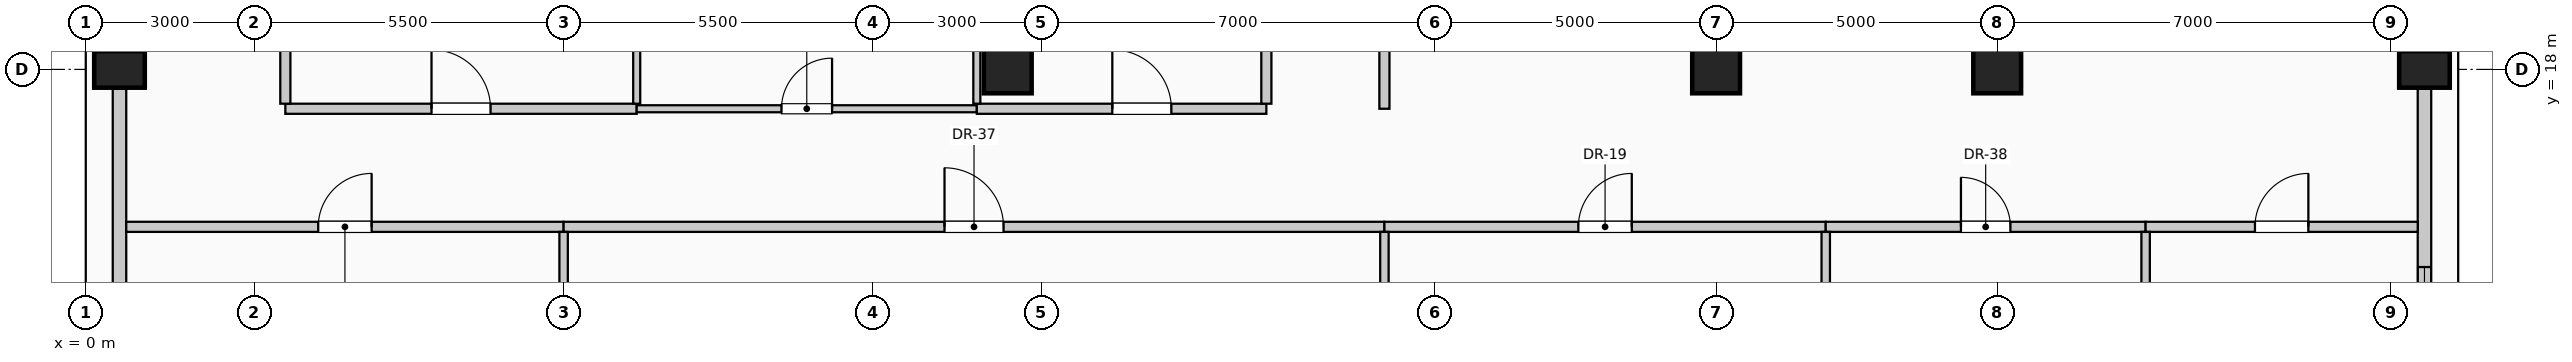
"""IFC4 building model, lengths in metres.
Left out: names, types, materials, properties, quantities, classifications, styles, units other than length and angle.
Written with IfcOpenShell. Run it as: python <this file> out.ifc"""

import sys

from ifc_helpers import new_model, si_unit, direction, frame, frame_2d, origin, origin_2d, place, context, subcontext, project, spatial, rectangle, circle, extrude, element, fill, save


model = new_model("IFC4")
c1 = context("Model", 3, precision=1e-05, world=origin(), true_north=direction((0.0, 1.0)))
c2 = subcontext(c1, "Body", "Model", "MODEL_VIEW")
j1 = project(units=[si_unit("LENGTHUNIT", "METRE"), si_unit("PLANEANGLEUNIT", "RADIAN")], contexts=[c1])
p1 = place(None, origin())
s1 = spatial("IfcSite", under=j1, at=p1, CompositionType="ELEMENT")
p2 = place(p1, origin())
s2 = spatial("IfcBuilding", under=s1, at=p2, CompositionType="ELEMENT")
p3 = place(p2, frame((0.0, 0.0, 301.0)))
s3 = spatial("IfcBuildingStorey", under=s2, at=p3, CompositionType="ELEMENT", Elevation=301.0)
for number, where, z_axis, x_axis in (
    (1, (0.6, 18.0, 0.0), (0.0, 0.0, 1.0), (0.0, 1.0, 0.0)),
    (2, (41.6, 18.0, 0.0), (0.0, 0.0, 1.0), (0.0, 1.0, 0.0)),
):
    element("IfcColumn", number, at=place(p3, frame(where, z_axis=z_axis, x_axis=x_axis)), inside=s3, PredefinedType="COLUMN", context=c2, shape_type="SweptSolid", body=[
        extrude(rectangle(XDim=0.65, YDim=0.9, at=origin_2d()), origin(), (0.0, 0.0, 1.0), 4.0),
    ])
for number, where, z_axis, x_axis in (
    (3, (16.4, 18.0, 0.0), (0.0, 0.0, 1.0), (1.0, 0.0, 0.0)),
    (4, (29.0, 18.0, 0.0), (0.0, 0.0, 1.0), (1.0, 0.0, 0.0)),
    (5, (34.0, 18.0, 0.0), (0.0, 0.0, 1.0), (1.0, 0.0, 0.0)),
):
    element("IfcColumn", number, at=place(p3, frame(where, z_axis=z_axis, x_axis=x_axis)), inside=s3, PredefinedType="COLUMN", context=c2, shape_type="SweptSolid", body=[
        extrude(circle(Radius=0.425, at=origin_2d()), origin(), (0.0, 0.0, 1.0), 4.0),
    ])
p4 = place(p3, frame((0.6, 10.345, 0.0), z_axis=(0.0, 0.0, 1.0), x_axis=(0.0, 1.0, 0.0)))
e6 = element("IfcWall", 6, at=p4, inside=s3, PredefinedType="SOLIDWALL", context=c2, shape_type="SweptSolid", body=[
    extrude(rectangle(XDim=7.31, YDim=0.24, at=frame_2d((3.655, 0.0))), origin(), (0.0, 0.0, 1.0), 3.025),
])
p5 = place(p4, frame((1.037, 0.0, 0.35)))
e7 = element("IfcOpeningElement", 7, at=p5, cuts=e6, PredefinedType="OPENING", context=c2, shape_type="SweptSolid", body=[
    extrude(rectangle(XDim=2.1, YDim=2.2, at=frame_2d((1.05, 1.1))), frame((0.0, 0.13, 0.0), z_axis=(0.0, -1.0, 0.0), x_axis=(1.0, 0.0, 0.0)), (0.0, 0.0, 1.0), 0.26),
])
p6 = place(p3, frame((41.6, 17.655, 0.0), z_axis=(0.0, 0.0, 1.0), x_axis=(0.0, -1.0, 0.0)))
e8 = element("IfcWall", 8, at=p6, inside=s3, PredefinedType="SOLIDWALL", context=c2, shape_type="SweptSolid", body=[
    extrude(rectangle(XDim=13.71, YDim=0.24, at=frame_2d((6.855, 0.0))), origin(), (0.0, 0.0, 1.0), 3.015),
])
p7 = place(p6, frame((3.17, 0.0, 0.35)))
e9 = element("IfcOpeningElement", 9, at=p7, cuts=e8, PredefinedType="OPENING", context=c2, shape_type="SweptSolid", body=[
    extrude(rectangle(XDim=2.1, YDim=2.2, at=frame_2d((1.05, 1.1))), frame((0.0, 0.13, 0.0), z_axis=(0.0, -1.0, 0.0), x_axis=(1.0, 0.0, 0.0)), (0.0, 0.0, 1.0), 0.26),
])
p8 = place(p6, frame((8.44, 0.0, 0.35)))
e10 = element("IfcOpeningElement", 10, at=p8, cuts=e8, PredefinedType="OPENING", context=c2, shape_type="SweptSolid", body=[
    extrude(rectangle(XDim=2.1, YDim=2.2, at=frame_2d((1.05, 1.1))), frame((0.0, 0.13, 0.0), z_axis=(0.0, -1.0, 0.0), x_axis=(1.0, 0.0, 0.0)), (0.0, 0.0, 1.0), 0.26),
])
p9 = place(p3, frame((0.72, 15.2, 0.0), z_axis=(0.0, 0.0, 1.0), x_axis=(1.0, 0.0, 0.0)))
e11 = element("IfcWall", 11, at=p9, inside=s3, PredefinedType="PARTITIONING", context=c2, shape_type="SweptSolid", body=[
    extrude(rectangle(XDim=7.78, YDim=0.18, at=frame_2d((3.89, 0.0))), origin(), (0.0, 0.0, 1.0), 3.775),
])
p10 = place(p9, frame((3.415, 0.0, 0.0)))
e12 = element("IfcOpeningElement", 12, at=p10, cuts=e11, PredefinedType="OPENING", context=c2, shape_type="SweptSolid", body=[
    extrude(rectangle(XDim=0.95, YDim=2.15, at=frame_2d((0.475, 1.075))), frame((0.0, 0.1, 0.0), z_axis=(0.0, -1.0, 0.0), x_axis=(1.0, 0.0, 0.0)), (0.0, 0.0, 1.0), 0.2),
])
p11 = place(p3, frame((8.5, 15.2, 0.0), z_axis=(0.0, 0.0, 1.0), x_axis=(1.0, 0.0, 0.0)))
e13 = element("IfcWall", 13, at=p11, inside=s3, PredefinedType="PARTITIONING", context=c2, shape_type="SweptSolid", body=[
    extrude(rectangle(XDim=14.6, YDim=0.18, at=frame_2d((7.3, 0.0))), origin(), (0.0, 0.0, 1.0), 3.775),
])
p12 = place(p11, frame((6.775, 0.0, 0.0)))
e14 = element("IfcOpeningElement", 14, at=p12, cuts=e13, PredefinedType="OPENING", context=c2, shape_type="SweptSolid", body=[
    extrude(rectangle(XDim=1.05, YDim=2.15, at=frame_2d((0.525, 1.075))), frame((0.0, 0.1, 0.0), z_axis=(0.0, -1.0, 0.0), x_axis=(1.0, 0.0, 0.0)), (0.0, 0.0, 1.0), 0.2),
])
p13 = place(p3, frame((23.1, 15.2, 0.0), z_axis=(0.0, 0.0, 1.0), x_axis=(1.0, 0.0, 0.0)))
e15 = element("IfcWall", 15, at=p13, inside=s3, PredefinedType="PARTITIONING", context=c2, shape_type="SweptSolid", body=[
    extrude(rectangle(XDim=7.85, YDim=0.18, at=frame_2d((3.925, 0.0))), origin(), (0.0, 0.0, 1.0), 3.775),
])
p14 = place(p13, frame((3.45, 0.0, 0.0)))
e16 = element("IfcOpeningElement", 16, at=p14, cuts=e15, PredefinedType="OPENING", context=c2, shape_type="SweptSolid", body=[
    extrude(rectangle(XDim=0.95, YDim=2.15, at=frame_2d((0.475, 1.075))), frame((0.0, 0.1, 0.0), z_axis=(0.0, -1.0, 0.0), x_axis=(1.0, 0.0, 0.0)), (0.0, 0.0, 1.0), 0.2),
])
p15 = place(p3, frame((30.95, 15.2, 0.0), z_axis=(0.0, 0.0, 1.0), x_axis=(1.0, 0.0, 0.0)))
e17 = element("IfcWall", 17, at=p15, inside=s3, PredefinedType="PARTITIONING", context=c2, shape_type="SweptSolid", body=[
    extrude(rectangle(XDim=5.69, YDim=0.18, at=frame_2d((2.845, 0.0))), origin(), (0.0, 0.0, 1.0), 3.775),
])
p16 = place(p15, frame((2.405, 0.0, 0.0)))
e18 = element("IfcOpeningElement", 18, at=p16, cuts=e17, PredefinedType="OPENING", context=c2, shape_type="SweptSolid", body=[
    extrude(rectangle(XDim=0.88, YDim=2.1, at=frame_2d((0.44, 1.05))), frame((0.0, 0.1, 0.0), z_axis=(0.0, -1.0, 0.0), x_axis=(1.0, 0.0, 0.0)), (0.0, 0.0, 1.0), 0.2),
])
p17 = place(p3, frame((36.64, 15.2, 0.0), z_axis=(0.0, 0.0, 1.0), x_axis=(1.0, 0.0, 0.0)))
e19 = element("IfcWall", 19, at=p17, inside=s3, PredefinedType="PARTITIONING", context=c2, shape_type="SweptSolid", body=[
    extrude(rectangle(XDim=4.84, YDim=0.18, at=frame_2d((2.42, 0.0))), origin(), (0.0, 0.0, 1.0), 3.775),
])
p18 = place(p17, frame((1.945, 0.0, 0.0)))
e20 = element("IfcOpeningElement", 20, at=p18, cuts=e19, PredefinedType="OPENING", context=c2, shape_type="SweptSolid", body=[
    extrude(rectangle(XDim=0.95, YDim=2.15, at=frame_2d((0.475, 1.075))), frame((0.0, 0.1, 0.0), z_axis=(0.0, -1.0, 0.0), x_axis=(1.0, 0.0, 0.0)), (0.0, 0.0, 1.0), 0.2),
])
p19 = place(p3, frame((3.55, 17.3, 0.0), z_axis=(0.0, 0.0, 1.0), x_axis=(1.0, 0.0, 0.0)))
e21 = element("IfcWall", 21, at=p19, inside=s3, PredefinedType="PARTITIONING", context=c2, shape_type="SweptSolid", body=[
    extrude(rectangle(XDim=6.25, YDim=0.18, at=frame_2d((3.125, 0.0))), origin(), (0.0, 0.0, 1.0), 3.775),
])
p20 = place(p19, frame((2.6, 0.0, 0.0)))
e22 = element("IfcOpeningElement", 22, at=p20, cuts=e21, PredefinedType="OPENING", context=c2, shape_type="SweptSolid", body=[
    extrude(rectangle(XDim=1.05, YDim=2.15, at=frame_2d((0.525, 1.075))), frame((0.0, 0.1, 0.0), z_axis=(0.0, -1.0, 0.0), x_axis=(1.0, 0.0, 0.0)), (0.0, 0.0, 1.0), 0.2),
])
p21 = place(p3, frame((9.8, 17.3, 0.0), z_axis=(0.0, 0.0, 1.0), x_axis=(1.0, 0.0, 0.0)))
e23 = element("IfcWall", 23, at=p21, inside=s3, PredefinedType="PARTITIONING", context=c2, shape_type="SweptSolid", body=[
    extrude(rectangle(XDim=6.05, YDim=0.125, at=frame_2d((3.025, 0.0))), origin(), (0.0, 0.0, 1.0), 3.775),
])
p22 = place(p21, frame((2.575, 0.0, 0.0)))
e24 = element("IfcOpeningElement", 24, at=p22, cuts=e23, PredefinedType="OPENING", context=c2, shape_type="SweptSolid", body=[
    extrude(rectangle(XDim=0.9, YDim=2.1, at=frame_2d((0.45, 1.05))), frame((0.0, 0.073, 0.0), z_axis=(0.0, -1.0, 0.0), x_axis=(1.0, 0.0, 0.0)), (0.0, 0.0, 1.0), 0.145),
])
p23 = place(p3, frame((15.85, 17.3, 0.0), z_axis=(0.0, 0.0, 1.0), x_axis=(1.0, 0.0, 0.0)))
e25 = element("IfcWall", 25, at=p23, inside=s3, PredefinedType="PARTITIONING", context=c2, shape_type="SweptSolid", body=[
    extrude(rectangle(XDim=5.15, YDim=0.18, at=frame_2d((2.575, 0.0))), origin(), (0.0, 0.0, 1.0), 3.775),
])
p24 = place(p23, frame((2.41, 0.0, 0.0)))
e26 = element("IfcOpeningElement", 26, at=p24, cuts=e25, PredefinedType="OPENING", context=c2, shape_type="SweptSolid", body=[
    extrude(rectangle(XDim=1.05, YDim=2.15, at=frame_2d((0.525, 1.075))), frame((0.0, 0.1, 0.0), z_axis=(0.0, -1.0, 0.0), x_axis=(1.0, 0.0, 0.0)), (0.0, 0.0, 1.0), 0.2),
])
p25 = place(p3, frame((3.55, 17.39, 0.0), z_axis=(0.0, 0.0, 1.0), x_axis=(0.0, 1.0, 0.0)))
e27 = element("IfcWall", 27, at=p25, inside=s3, PredefinedType="PARTITIONING", context=c2, shape_type="SweptSolid", body=[
    extrude(rectangle(XDim=7.335, YDim=0.18, at=frame_2d((3.667, 0.0))), origin(), (0.0, 0.0, 1.0), 3.775),
])
p26 = place(p3, frame((8.5, 1.05, 0.0), z_axis=(0.0, 0.0, 1.0), x_axis=(0.0, 1.0, 0.0)))
e28 = element("IfcWall", 28, at=p26, inside=s3, PredefinedType="PARTITIONING", context=c2, shape_type="SweptSolid", body=[
    extrude(rectangle(XDim=14.06, YDim=0.15, at=frame_2d((7.03, 0.0))), origin(), (0.0, 0.0, 1.0), 3.775),
])
for number, where, z_axis, x_axis in (
    (29, (9.8, 17.39, 0.0), (0.0, 0.0, 1.0), (0.0, 1.0, 0.0)),
    (30, (15.85, 17.39, 0.0), (0.0, 0.0, 1.0), (0.0, 1.0, 0.0)),
):
    element("IfcWall", number, at=place(p3, frame(where, z_axis=z_axis, x_axis=x_axis)), inside=s3, PredefinedType="PARTITIONING", context=c2, shape_type="SweptSolid", body=[
        extrude(rectangle(XDim=7.335, YDim=0.125, at=frame_2d((3.667, 0.0))), origin(), (0.0, 0.0, 1.0), 3.775),
    ])
p27 = place(p3, frame((21.0, 17.39, 0.0), z_axis=(0.0, 0.0, 1.0), x_axis=(0.0, 1.0, 0.0)))
e31 = element("IfcWall", 31, at=p27, inside=s3, PredefinedType="PARTITIONING", context=c2, shape_type="SweptSolid", body=[
    extrude(rectangle(XDim=7.335, YDim=0.18, at=frame_2d((3.667, 0.0))), origin(), (0.0, 0.0, 1.0), 3.775),
])
p28 = place(p3, frame((23.1, 0.72, 0.0), z_axis=(0.0, 0.0, 1.0), x_axis=(0.0, 1.0, 0.0)))
e32 = element("IfcWall", 32, at=p28, inside=s3, PredefinedType="PARTITIONING", context=c2, shape_type="SweptSolid", body=[
    extrude(rectangle(XDim=14.39, YDim=0.15, at=frame_2d((7.195, 0.0))), origin(), (0.0, 0.0, 1.0), 3.775),
])
p29 = place(p3, frame((23.1, 17.3, 0.0), z_axis=(0.0, 0.0, 1.0), x_axis=(0.0, 1.0, 0.0)))
e33 = element("IfcWall", 33, at=p29, inside=s3, PredefinedType="PARTITIONING", context=c2, shape_type="SweptSolid", body=[
    extrude(rectangle(XDim=6.825, YDim=0.18, at=frame_2d((3.413, 0.0))), origin(), (0.0, 0.0, 1.0), 3.775),
])
p30 = place(p29, frame((2.887, 0.0, 0.0)))
e34 = element("IfcOpeningElement", 34, at=p30, cuts=e33, PredefinedType="OPENING", context=c2, shape_type="SweptSolid", body=[
    extrude(rectangle(XDim=1.05, YDim=2.15, at=frame_2d((0.525, 1.075))), frame((0.0, 0.1, 0.0), z_axis=(0.0, -1.0, 0.0), x_axis=(1.0, 0.0, 0.0)), (0.0, 0.0, 1.0), 0.2),
])
for number, where, z_axis, x_axis in (
    (35, (30.95, 0.72, 0.0), (0.0, 0.0, 1.0), (0.0, 1.0, 0.0)),
    (36, (36.64, 0.72, 0.0), (0.0, 0.0, 1.0), (0.0, 1.0, 0.0)),
):
    element("IfcWall", number, at=place(p3, frame(where, z_axis=z_axis, x_axis=x_axis)), inside=s3, PredefinedType="PARTITIONING", context=c2, shape_type="SweptSolid", body=[
        extrude(rectangle(XDim=14.39, YDim=0.15, at=frame_2d((7.195, 0.0))), origin(), (0.0, 0.0, 1.0), 3.775),
    ])
p31 = place(p7, origin())
e37 = element("IfcWindow", 37, at=p31, inside=s3, PartitioningType="SINGLE_PANEL", PredefinedType="WINDOW", context=c2, shape_type="SweptSolid", body=[
    extrude(rectangle(XDim=2.1, YDim=2.2, at=frame_2d((1.05, 1.1))), frame((0.0, 0.03, 0.0), z_axis=(0.0, -1.0, 0.0), x_axis=(1.0, 0.0, 0.0)), (0.0, 0.0, 1.0), 0.06),
])
fill(e9, e37)
p32 = place(p10, origin())
e38 = element("IfcDoor", 38, at=p32, inside=s3, OperationType="SINGLE_SWING_RIGHT", PredefinedType="DOOR", context=c2, shape_type="SweptSolid", body=[
    extrude(rectangle(XDim=0.95, YDim=2.15, at=frame_2d((0.475, 1.075))), frame((0.0, 0.025, 0.0), z_axis=(0.0, -1.0, 0.0), x_axis=(1.0, 0.0, 0.0)), (0.0, 0.0, 1.0), 0.05),
])
fill(e12, e38)
p33 = place(p12, origin())
e39 = element("IfcDoor", 39, at=p33, inside=s3, OperationType="SINGLE_SWING_LEFT", PredefinedType="DOOR", context=c2, shape_type="SweptSolid", body=[
    extrude(rectangle(XDim=1.05, YDim=2.15, at=frame_2d((0.525, 1.075))), frame((0.0, 0.025, 0.0), z_axis=(0.0, -1.0, 0.0), x_axis=(1.0, 0.0, 0.0)), (0.0, 0.0, 1.0), 0.05),
])
fill(e14, e39)
p34 = place(p14, origin())
e40 = element("IfcDoor", 40, at=p34, inside=s3, OperationType="SINGLE_SWING_RIGHT", PredefinedType="DOOR", context=c2, shape_type="SweptSolid", body=[
    extrude(rectangle(XDim=0.95, YDim=2.15, at=frame_2d((0.475, 1.075))), frame((0.0, 0.025, 0.0), z_axis=(0.0, -1.0, 0.0), x_axis=(1.0, 0.0, 0.0)), (0.0, 0.0, 1.0), 0.05),
])
fill(e16, e40)
p35 = place(p16, origin())
e41 = element("IfcDoor", 41, at=p35, inside=s3, OperationType="SINGLE_SWING_LEFT", PredefinedType="DOOR", context=c2, shape_type="SweptSolid", body=[
    extrude(rectangle(XDim=0.88, YDim=2.1, at=frame_2d((0.44, 1.05))), frame((0.0, 0.025, 0.0), z_axis=(0.0, -1.0, 0.0), x_axis=(1.0, 0.0, 0.0)), (0.0, 0.0, 1.0), 0.05),
])
fill(e18, e41)
p36 = place(p18, origin())
e42 = element("IfcDoor", 42, at=p36, inside=s3, OperationType="SINGLE_SWING_RIGHT", PredefinedType="DOOR", context=c2, shape_type="SweptSolid", body=[
    extrude(rectangle(XDim=0.95, YDim=2.15, at=frame_2d((0.475, 1.075))), frame((0.0, 0.025, 0.0), z_axis=(0.0, -1.0, 0.0), x_axis=(1.0, 0.0, 0.0)), (0.0, 0.0, 1.0), 0.05),
])
fill(e20, e42)
p37 = place(p20, origin())
e43 = element("IfcDoor", 43, at=p37, inside=s3, OperationType="SINGLE_SWING_LEFT", PredefinedType="DOOR", context=c2, shape_type="SweptSolid", body=[
    extrude(rectangle(XDim=1.05, YDim=2.15, at=frame_2d((0.525, 1.075))), frame((0.0, 0.025, 0.0), z_axis=(0.0, -1.0, 0.0), x_axis=(1.0, 0.0, 0.0)), (0.0, 0.0, 1.0), 0.05),
])
fill(e22, e43)
p38 = place(p22, origin())
e44 = element("IfcDoor", 44, at=p38, inside=s3, OperationType="SINGLE_SWING_RIGHT", PredefinedType="DOOR", context=c2, shape_type="SweptSolid", body=[
    extrude(rectangle(XDim=0.9, YDim=2.1, at=frame_2d((0.45, 1.05))), frame((0.0, 0.025, 0.0), z_axis=(0.0, -1.0, 0.0), x_axis=(1.0, 0.0, 0.0)), (0.0, 0.0, 1.0), 0.05),
])
fill(e24, e44)
p39 = place(p24, origin())
e45 = element("IfcDoor", 45, at=p39, inside=s3, OperationType="SINGLE_SWING_LEFT", PredefinedType="DOOR", context=c2, shape_type="SweptSolid", body=[
    extrude(rectangle(XDim=1.05, YDim=2.15, at=frame_2d((0.525, 1.075))), frame((0.0, 0.025, 0.0), z_axis=(0.0, -1.0, 0.0), x_axis=(1.0, 0.0, 0.0)), (0.0, 0.0, 1.0), 0.05),
])
fill(e26, e45)
save(model, sys.argv[1])
